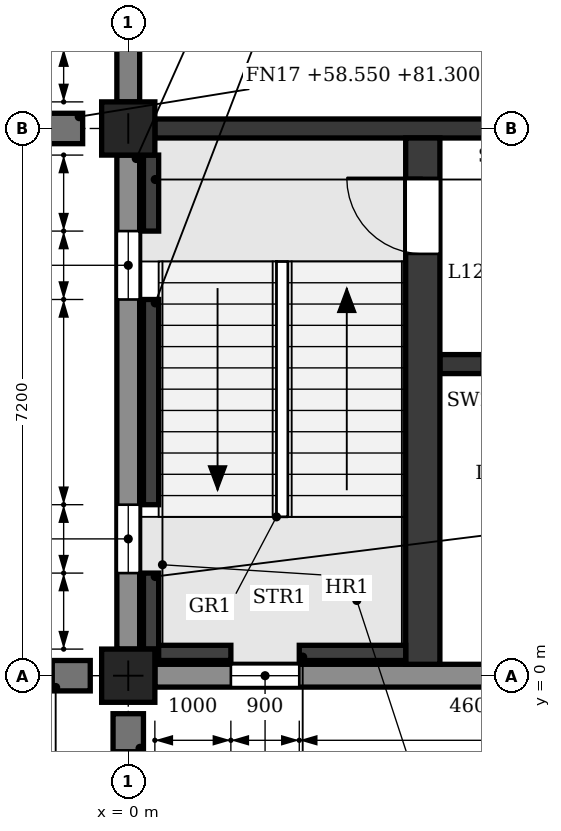
"""IFC4 building model, lengths in metres.
Left out: names, types, materials, properties, quantities, classifications, styles, units other than length and angle.
Written with IfcOpenShell. Run it as: python <this file> out.ifc"""

import sys

from ifc_helpers import new_model, si_unit, direction, frame, frame_2d, origin, origin_2d, place, context, subcontext, project, spatial, polyline, rectangle, outline, extrude, element, fill, save


model = new_model("IFC4")
c1 = context("Model", 3, precision=1e-05, world=origin(), true_north=direction((0.0, 1.0)))
c2 = subcontext(c1, "Body", "Model", "MODEL_VIEW")
j1 = project(units=[si_unit("LENGTHUNIT", "METRE"), si_unit("PLANEANGLEUNIT", "RADIAN")], contexts=[c1])
p1 = place(None, origin())
s1 = spatial("IfcSite", under=j1, at=p1, CompositionType="ELEMENT")
p2 = place(p1, origin())
s2 = spatial("IfcBuilding", under=s1, at=p2, CompositionType="ELEMENT")
p3 = place(p2, frame((0.0, 0.0, 58.8)))
s3 = spatial("IfcBuildingStorey", under=s2, at=p3, CompositionType="ELEMENT", Elevation=58.8)
for number, where, z_axis, x_axis in (
    (1, (0.0, 0.0, 0.0), (0.0, 0.0, 1.0), (1.0, 0.0, 0.0)),
    (2, (0.0, 7.2, 0.0), (0.0, 0.0, 1.0), (1.0, 0.0, 0.0)),
):
    element("IfcColumn", number, at=place(p3, frame(where, z_axis=z_axis, x_axis=x_axis)), inside=s3, PredefinedType="COLUMN", context=c2, shape_type="SweptSolid", body=[
        extrude(rectangle(XDim=0.7, YDim=0.7, at=origin_2d()), origin(), (0.0, 0.0, 1.0), 4.5),
    ])
p4 = place(p3, frame((0.0, 0.35, 0.0), z_axis=(0.0, 0.0, 1.0), x_axis=(0.0, 1.0, 0.0)))
e3 = element("IfcWall", 3, at=p4, inside=s3, PredefinedType="STANDARD", context=c2, shape_type="SweptSolid", body=[
    extrude(rectangle(XDim=6.5, YDim=0.3, at=frame_2d((3.25, 0.0))), origin(), (0.0, 0.0, 1.0), 3.65),
])
p5 = place(p4, frame((1.0, 0.0, 0.9)))
e4 = element("IfcOpeningElement", 4, at=p5, cuts=e3, PredefinedType="OPENING", context=c2, shape_type="SweptSolid", body=[
    extrude(outline(polyline([(0.0, 0.0), (0.9, 0.0), (0.9, 2.25), (0.45, 2.7), (0.0, 2.25), (0.0, 0.0)])), frame((0.0, 0.16, 0.0), z_axis=(0.0, -1.0, 0.0), x_axis=(1.0, 0.0, 0.0)), (0.0, 0.0, 1.0), 0.32),
])
p6 = place(p4, frame((4.6, 0.0, 0.9)))
e5 = element("IfcOpeningElement", 5, at=p6, cuts=e3, PredefinedType="OPENING", context=c2, shape_type="SweptSolid", body=[
    extrude(outline(polyline([(0.0, 0.0), (0.9, 0.0), (0.9, 2.25), (0.45, 2.7), (0.0, 2.25), (0.0, 0.0)])), frame((0.0, 0.16, 0.0), z_axis=(0.0, -1.0, 0.0), x_axis=(1.0, 0.0, 0.0)), (0.0, 0.0, 1.0), 0.32),
])
p7 = place(p3, frame((0.0, 7.55, 0.0), z_axis=(0.0, 0.0, 1.0), x_axis=(0.0, 1.0, 0.0)))
e6 = element("IfcWall", 6, at=p7, inside=s3, PredefinedType="STANDARD", context=c2, shape_type="SweptSolid", body=[
    extrude(rectangle(XDim=6.5, YDim=0.3, at=frame_2d((3.25, 0.0))), origin(), (0.0, 0.0, 1.0), 3.65),
])
p8 = place(p7, frame((0.7, 0.0, 0.9)))
e7 = element("IfcOpeningElement", 7, at=p8, cuts=e6, PredefinedType="OPENING", context=c2, shape_type="SweptSolid", body=[
    extrude(outline(polyline([(0.0, 0.0), (1.5, 0.0), (1.5, 1.95), (0.75, 2.7), (0.0, 1.95), (0.0, 0.0)])), frame((0.0, 0.16, 0.0), z_axis=(0.0, -1.0, 0.0), x_axis=(1.0, 0.0, 0.0)), (0.0, 0.0, 1.0), 0.32),
])
p9 = place(p7, frame((4.3, 0.0, 0.9)))
e8 = element("IfcOpeningElement", 8, at=p9, cuts=e6, PredefinedType="OPENING", context=c2, shape_type="SweptSolid", body=[
    extrude(outline(polyline([(0.0, 0.0), (1.5, 0.0), (1.5, 1.95), (0.75, 2.7), (0.0, 1.95), (0.0, 0.0)])), frame((0.0, 0.16, 0.0), z_axis=(0.0, -1.0, 0.0), x_axis=(1.0, 0.0, 0.0)), (0.0, 0.0, 1.0), 0.32),
])
p10 = place(p3, frame((0.35, 0.0, 0.0), z_axis=(0.0, 0.0, 1.0), x_axis=(1.0, 0.0, 0.0)))
e9 = element("IfcWall", 9, at=p10, inside=s3, PredefinedType="STANDARD", context=c2, shape_type="SweptSolid", body=[
    extrude(rectangle(XDim=6.5, YDim=0.3, at=frame_2d((3.25, 0.0))), origin(), (0.0, 0.0, 1.0), 3.65),
])
p11 = place(p10, frame((1.0, 0.0, 0.9)))
e10 = element("IfcOpeningElement", 10, at=p11, cuts=e9, PredefinedType="OPENING", context=c2, shape_type="SweptSolid", body=[
    extrude(outline(polyline([(0.0, 0.0), (0.9, 0.0), (0.9, 2.25), (0.45, 2.7), (0.0, 2.25), (0.0, 0.0)])), frame((0.0, 0.16, 0.0), z_axis=(0.0, -1.0, 0.0), x_axis=(1.0, 0.0, 0.0)), (0.0, 0.0, 1.0), 0.32),
])
for number, where, z_axis, x_axis in (
    (11, (-0.5, 0.0, -0.25), (0.0, 0.0, 1.0), (-1.0, 0.0, 0.0)),
    (12, (0.0, -0.5, -0.25), (0.0, 0.0, 1.0), (0.0, -1.0, 0.0)),
):
    element("IfcWall", number, at=place(p3, frame(where, z_axis=z_axis, x_axis=x_axis)), inside=s3, PredefinedType="POLYGONAL", context=c2, shape_type="SweptSolid", body=[
        extrude(outline(polyline([(0.5, 0.0), (0.5, 23.85), (0.0, 23.85), (0.0, 0.0), (0.5, 0.0)])), frame((0.0, 0.2, 0.0), z_axis=(0.0, -1.0, 0.0), x_axis=(1.0, 0.0, 0.0)), (0.0, 0.0, 1.0), 0.4),
    ])
p12 = place(p3, frame((-0.6, 7.2, -0.25), z_axis=(0.0, 0.0, 1.0), x_axis=(-1.0, 0.0, 0.0)))
e13 = element("IfcWall", 13, at=p12, inside=s3, PredefinedType="POLYGONAL", context=c2, shape_type="SweptSolid", body=[
    extrude(outline(polyline([(0.5, 0.0), (0.5, 22.225), (0.15, 22.75), (0.0, 22.75), (0.0, 0.0), (0.5, 0.0)])), frame((0.0, 0.2, 0.0), z_axis=(0.0, -1.0, 0.0), x_axis=(1.0, 0.0, 0.0)), (0.0, 0.0, 1.0), 0.4),
])
p13 = place(p3, frame((0.35, 7.2, 0.0), z_axis=(0.0, 0.0, 1.0), x_axis=(1.0, 0.0, 0.0)))
e14 = element("IfcWall", 14, at=p13, inside=s3, PredefinedType="SHEAR", context=c2, shape_type="SweptSolid", body=[
    extrude(rectangle(XDim=6.5, YDim=0.25, at=frame_2d((3.25, 0.0))), origin(), (0.0, 0.0, 1.0), 3.6),
])
p14 = place(p13, frame((4.9, 0.0, 0.0)))
e15 = element("IfcOpeningElement", 15, at=p14, cuts=e14, PredefinedType="OPENING", context=c2, shape_type="SweptSolid", body=[
    extrude(rectangle(XDim=1.1, YDim=2.1, at=frame_2d((0.55, 1.05))), frame((0.0, 0.135, 0.0), z_axis=(0.0, -1.0, 0.0), x_axis=(1.0, 0.0, 0.0)), (0.0, 0.0, 1.0), 0.27),
])
p15 = place(p3, frame((0.3, 0.35, -0.25), z_axis=(0.0, 0.0, 1.0), x_axis=(0.0, 1.0, 0.0)))
e16 = element("IfcWall", 16, at=p15, inside=s3, PredefinedType="SHEAR", context=c2, shape_type="SweptSolid", body=[
    extrude(rectangle(XDim=1.0, YDim=0.2, at=frame_2d((0.5, 0.0))), origin(), (0.0, 0.0, 1.0), 4.5),
])
p16 = place(p3, frame((0.3, 2.25, -0.25), z_axis=(0.0, 0.0, 1.0), x_axis=(0.0, 1.0, 0.0)))
e17 = element("IfcWall", 17, at=p16, inside=s3, PredefinedType="SHEAR", context=c2, shape_type="SweptSolid", body=[
    extrude(rectangle(XDim=2.7, YDim=0.2, at=frame_2d((1.35, 0.0))), origin(), (0.0, 0.0, 1.0), 4.5),
])
p17 = place(p3, frame((0.3, 5.85, -0.25), z_axis=(0.0, 0.0, 1.0), x_axis=(0.0, 1.0, 0.0)))
e18 = element("IfcWall", 18, at=p17, inside=s3, PredefinedType="SHEAR", context=c2, shape_type="SweptSolid", body=[
    extrude(rectangle(XDim=1.0, YDim=0.2, at=frame_2d((0.5, 0.0))), origin(), (0.0, 0.0, 1.0), 4.5),
])
p18 = place(p3, frame((0.4, 0.3, -0.25), z_axis=(0.0, 0.0, 1.0), x_axis=(1.0, 0.0, 0.0)))
e19 = element("IfcWall", 19, at=p18, inside=s3, PredefinedType="SHEAR", context=c2, shape_type="SweptSolid", body=[
    extrude(rectangle(XDim=0.95, YDim=0.2, at=frame_2d((0.475, 0.0))), origin(), (0.0, 0.0, 1.0), 4.5),
])
p19 = place(p3, frame((2.25, 0.3, -0.25), z_axis=(0.0, 0.0, 1.0), x_axis=(1.0, 0.0, 0.0)))
e20 = element("IfcWall", 20, at=p19, inside=s3, PredefinedType="SHEAR", context=c2, shape_type="SweptSolid", body=[
    extrude(rectangle(XDim=1.4, YDim=0.2, at=frame_2d((0.7, 0.0))), origin(), (0.0, 0.0, 1.0), 4.5),
])
p20 = place(p3, frame((3.875, 0.15, 0.0), z_axis=(0.0, 0.0, 1.0), x_axis=(0.0, 1.0, 0.0)))
e21 = element("IfcWall", 21, at=p20, inside=s3, PredefinedType="SHEAR", context=c2, shape_type="SweptSolid", body=[
    extrude(rectangle(XDim=6.925, YDim=0.45, at=frame_2d((3.462, 0.0))), origin(), (0.0, 0.0, 1.0), 4.25),
])
p21 = place(p20, frame((5.4, 0.0, 0.0)))
e22 = element("IfcOpeningElement", 22, at=p21, cuts=e21, PredefinedType="OPENING", context=c2, shape_type="SweptSolid", body=[
    extrude(rectangle(XDim=1.0, YDim=2.1, at=frame_2d((0.5, 1.05))), frame((0.0, 0.235, 0.0), z_axis=(0.0, -1.0, 0.0), x_axis=(1.0, 0.0, 0.0)), (0.0, 0.0, 1.0), 0.47),
])
p22 = place(p3, frame((4.1, 4.1, 0.0), z_axis=(0.0, 0.0, 1.0), x_axis=(1.0, 0.0, 0.0)))
e23 = element("IfcWall", 23, at=p22, inside=s3, PredefinedType="SHEAR", context=c2, shape_type="SweptSolid", body=[
    extrude(rectangle(XDim=2.975, YDim=0.25, at=frame_2d((1.487, 0.0))), origin(), (0.0, 0.0, 1.0), 4.25),
])
p23 = place(p22, frame((0.55, 0.0, 0.0)))
e24 = element("IfcOpeningElement", 24, at=p23, cuts=e23, PredefinedType="OPENING", context=c2, shape_type="SweptSolid", body=[
    extrude(rectangle(XDim=0.9, YDim=2.1, at=frame_2d((0.45, 1.05))), frame((0.0, 0.135, 0.0), z_axis=(0.0, -1.0, 0.0), x_axis=(1.0, 0.0, 0.0)), (0.0, 0.0, 1.0), 0.27),
])
p24 = place(p11, origin())
e25 = element("IfcWindow", 25, at=p24, inside=s3, PartitioningType="SINGLE_PANEL", PredefinedType="WINDOW", context=c2, shape_type="SweptSolid", body=[
    extrude(outline(polyline([(0.0, 0.0), (0.9, 0.0), (0.9, 2.25), (0.45, 2.7), (0.0, 2.25), (0.0, 0.0)])), frame((0.0, 0.03, 0.0), z_axis=(0.0, -1.0, 0.0), x_axis=(1.0, 0.0, 0.0)), (0.0, 0.0, 1.0), 0.06),
])
fill(e10, e25)
p25 = place(p5, origin())
e26 = element("IfcWindow", 26, at=p25, inside=s3, PartitioningType="SINGLE_PANEL", PredefinedType="WINDOW", context=c2, shape_type="SweptSolid", body=[
    extrude(outline(polyline([(0.0, 0.0), (0.9, 0.0), (0.9, 2.25), (0.45, 2.7), (0.0, 2.25), (0.0, 0.0)])), frame((0.0, 0.03, 0.0), z_axis=(0.0, -1.0, 0.0), x_axis=(1.0, 0.0, 0.0)), (0.0, 0.0, 1.0), 0.06),
])
fill(e4, e26)
p26 = place(p6, origin())
e27 = element("IfcWindow", 27, at=p26, inside=s3, PartitioningType="SINGLE_PANEL", PredefinedType="WINDOW", context=c2, shape_type="SweptSolid", body=[
    extrude(outline(polyline([(0.0, 0.0), (0.9, 0.0), (0.9, 2.25), (0.45, 2.7), (0.0, 2.25), (0.0, 0.0)])), frame((0.0, 0.03, 0.0), z_axis=(0.0, -1.0, 0.0), x_axis=(1.0, 0.0, 0.0)), (0.0, 0.0, 1.0), 0.06),
])
fill(e5, e27)
p27 = place(p21, origin())
e28 = element("IfcDoor", 28, at=p27, inside=s3, OperationType="SINGLE_SWING_RIGHT", PredefinedType="DOOR", context=c2, shape_type="SweptSolid", body=[
    extrude(rectangle(XDim=1.0, YDim=2.1, at=frame_2d((0.5, 1.05))), frame((0.0, 0.025, 0.0), z_axis=(0.0, -1.0, 0.0), x_axis=(1.0, 0.0, 0.0)), (0.0, 0.0, 1.0), 0.05),
])
fill(e22, e28)
save(model, sys.argv[1])
